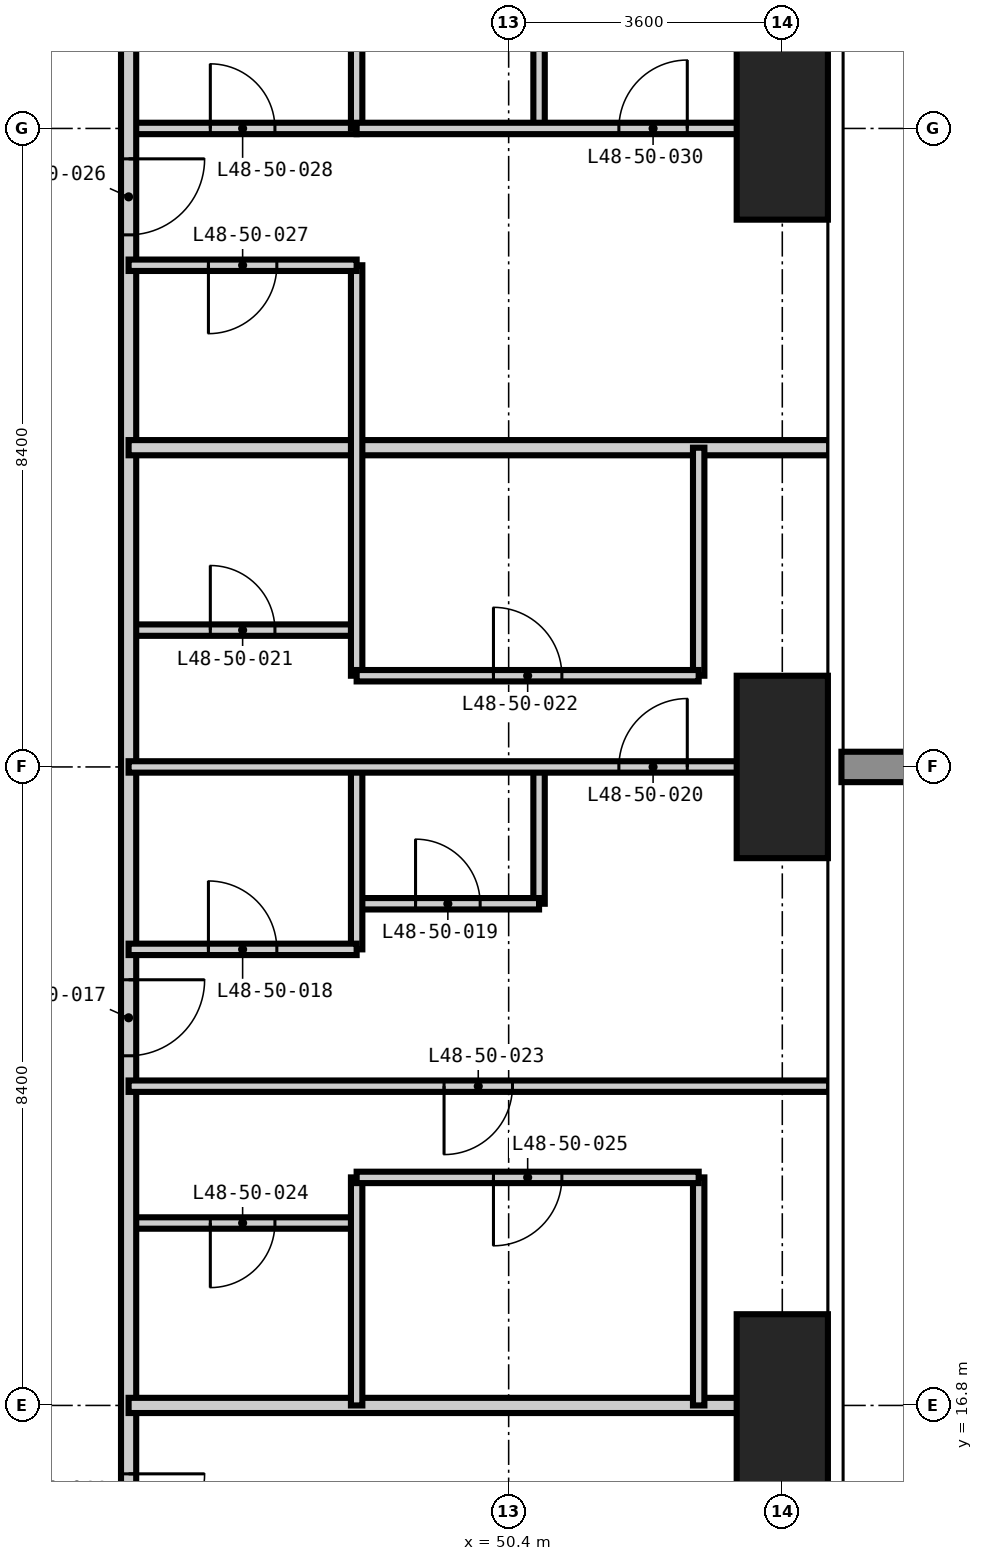
"""IFC4 building model, lengths in metres.
Left out: names, types, materials, properties, quantities, classifications, styles, units other than length and angle.
Written with IfcOpenShell. Run it as: python <this file> out.ifc"""

import sys

from ifc_helpers import new_model, si_unit, direction, frame, frame_2d, origin, origin_2d, place, context, subcontext, project, spatial, rectangle, extrude, element, fill, save


model = new_model("IFC4")
c1 = context("Model", 3, precision=1e-05, world=origin(), true_north=direction((0.0, 1.0)))
c2 = subcontext(c1, "Body", "Model", "MODEL_VIEW")
j1 = project(units=[si_unit("LENGTHUNIT", "METRE"), si_unit("PLANEANGLEUNIT", "RADIAN")], contexts=[c1])
p1 = place(None, origin())
s1 = spatial("IfcSite", under=j1, at=p1, CompositionType="ELEMENT")
p2 = place(p1, origin())
s2 = spatial("IfcBuilding", under=s1, at=p2, CompositionType="ELEMENT")
p3 = place(p2, frame((0.0, 0.0, 187.8)))
s3 = spatial("IfcBuildingStorey", under=s2, at=p3, CompositionType="ELEMENT", Elevation=187.8)
for number, where, z_axis, x_axis in (
    (1, (54.0, 16.8, -0.35), (0.0, 0.0, 1.0), (1.0, 0.0, 0.0)),
    (2, (54.0, 25.2, -0.35), (0.0, 0.0, 1.0), (1.0, 0.0, 0.0)),
    (3, (54.0, 33.6, -0.35), (0.0, 0.0, 1.0), (1.0, 0.0, 0.0)),
):
    element("IfcColumn", number, at=place(p3, frame(where, z_axis=z_axis, x_axis=x_axis)), inside=s3, PredefinedType="COLUMN", context=c2, shape_type="SweptSolid", body=[
        extrude(rectangle(XDim=1.2, YDim=2.4, at=origin_2d()), origin(), (0.0, 0.0, 1.0), 3.6),
    ])
p4 = place(p3, frame((50.8, 23.4, 0.0), z_axis=(0.0, 0.0, 1.0), x_axis=(0.0, 1.0, 0.0)))
e4 = element("IfcWall", 4, at=p4, inside=s3, PredefinedType="PARTITIONING", context=c2, shape_type="SweptSolid", body=[
    extrude(rectangle(XDim=1.8, YDim=0.15, at=frame_2d((0.9, 0.0))), origin(), (0.0, 0.0, 1.0), 3.25),
])
p5 = place(p3, frame((45.4, 19.2, 0.0), z_axis=(0.0, 0.0, 1.0), x_axis=(1.0, 0.0, 0.0)))
e5 = element("IfcWall", 5, at=p5, inside=s3, PredefinedType="PARTITIONING", context=c2, shape_type="SweptSolid", body=[
    extrude(rectangle(XDim=3.0, YDim=0.15, at=frame_2d((1.5, 0.0))), origin(), (0.0, 0.0, 1.0), 3.25),
])
p6 = place(p5, frame((1.075, 0.0, 0.0)))
e6 = element("IfcOpeningElement", 6, at=p6, cuts=e5, PredefinedType="OPENING", context=c2, shape_type="SweptSolid", body=[
    extrude(rectangle(XDim=0.85, YDim=2.1, at=frame_2d((0.425, 1.05))), frame((0.0, 0.085, 0.0), z_axis=(0.0, -1.0, 0.0), x_axis=(1.0, 0.0, 0.0)), (0.0, 0.0, 1.0), 0.17),
])
p7 = place(p3, frame((48.4, 23.4, 0.0), z_axis=(0.0, 0.0, 1.0), x_axis=(1.0, 0.0, 0.0)))
e7 = element("IfcWall", 7, at=p7, inside=s3, PredefinedType="PARTITIONING", context=c2, shape_type="SweptSolid", body=[
    extrude(rectangle(XDim=2.4, YDim=0.15, at=frame_2d((1.2, 0.0))), origin(), (0.0, 0.0, 1.0), 3.25),
])
p8 = place(p7, frame((0.775, 0.0, 0.0)))
e8 = element("IfcOpeningElement", 8, at=p8, cuts=e7, PredefinedType="OPENING", context=c2, shape_type="SweptSolid", body=[
    extrude(rectangle(XDim=0.85, YDim=2.1, at=frame_2d((0.425, 1.05))), frame((0.0, 0.085, 0.0), z_axis=(0.0, -1.0, 0.0), x_axis=(1.0, 0.0, 0.0)), (0.0, 0.0, 1.0), 0.17),
])
p9 = place(p3, frame((45.4, 27.0, 0.0), z_axis=(0.0, 0.0, 1.0), x_axis=(1.0, 0.0, 0.0)))
e9 = element("IfcWall", 9, at=p9, inside=s3, PredefinedType="PARTITIONING", context=c2, shape_type="SweptSolid", body=[
    extrude(rectangle(XDim=3.0, YDim=0.15, at=frame_2d((1.5, 0.0))), origin(), (0.0, 0.0, 1.0), 3.25),
])
p10 = place(p9, frame((1.075, 0.0, 0.0)))
e10 = element("IfcOpeningElement", 10, at=p10, cuts=e9, PredefinedType="OPENING", context=c2, shape_type="SweptSolid", body=[
    extrude(rectangle(XDim=0.85, YDim=2.1, at=frame_2d((0.425, 1.05))), frame((0.0, 0.085, 0.0), z_axis=(0.0, -1.0, 0.0), x_axis=(1.0, 0.0, 0.0)), (0.0, 0.0, 1.0), 0.17),
])
p11 = place(p3, frame((45.4, 33.6, 0.0), z_axis=(0.0, 0.0, 1.0), x_axis=(1.0, 0.0, 0.0)))
e11 = element("IfcWall", 11, at=p11, inside=s3, PredefinedType="PARTITIONING", context=c2, shape_type="SweptSolid", body=[
    extrude(rectangle(XDim=3.0, YDim=0.15, at=frame_2d((1.5, 0.0))), origin(), (0.0, 0.0, 1.0), 3.25),
])
p12 = place(p11, frame((1.075, 0.0, 0.0)))
e12 = element("IfcOpeningElement", 12, at=p12, cuts=e11, PredefinedType="OPENING", context=c2, shape_type="SweptSolid", body=[
    extrude(rectangle(XDim=0.85, YDim=2.1, at=frame_2d((0.425, 1.05))), frame((0.0, 0.085, 0.0), z_axis=(0.0, -1.0, 0.0), x_axis=(1.0, 0.0, 0.0)), (0.0, 0.0, 1.0), 0.17),
])
p13 = place(p3, frame((45.4, 44.2, 0.0), z_axis=(0.0, 0.0, 1.0), x_axis=(0.0, -1.0, 0.0)))
e13 = element("IfcWall", 13, at=p13, inside=s3, PredefinedType="PARTITIONING", context=c2, shape_type="SweptSolid", body=[
    extrude(rectangle(XDim=30.2, YDim=0.2, at=frame_2d((15.1, 0.0))), origin(), (0.0, 0.0, 1.0), 3.25),
])
p14 = place(p13, frame((21.8, 0.0, 0.0)))
e14 = element("IfcOpeningElement", 14, at=p14, cuts=e13, PredefinedType="OPENING", context=c2, shape_type="SweptSolid", body=[
    extrude(rectangle(XDim=1.0, YDim=2.2, at=frame_2d((0.5, 1.1))), frame((0.0, 0.11, 0.0), z_axis=(0.0, -1.0, 0.0), x_axis=(1.0, 0.0, 0.0)), (0.0, 0.0, 1.0), 0.22),
])
p15 = place(p13, frame((11.0, 0.0, 0.0)))
e15 = element("IfcOpeningElement", 15, at=p15, cuts=e13, PredefinedType="OPENING", context=c2, shape_type="SweptSolid", body=[
    extrude(rectangle(XDim=1.0, YDim=2.2, at=frame_2d((0.5, 1.1))), frame((0.0, 0.11, 0.0), z_axis=(0.0, -1.0, 0.0), x_axis=(1.0, 0.0, 0.0)), (0.0, 0.0, 1.0), 0.22),
])
p16 = place(p13, frame((3.8, 0.0, 0.0)))
e16 = element("IfcOpeningElement", 16, at=p16, cuts=e13, PredefinedType="OPENING", context=c2, shape_type="SweptSolid", body=[
    extrude(rectangle(XDim=1.0, YDim=2.2, at=frame_2d((0.5, 1.1))), frame((0.0, 0.11, 0.0), z_axis=(0.0, -1.0, 0.0), x_axis=(1.0, 0.0, 0.0)), (0.0, 0.0, 1.0), 0.22),
])
p17 = place(p13, frame((28.3, 0.0, 0.0)))
e17 = element("IfcOpeningElement", 17, at=p17, cuts=e13, PredefinedType="OPENING", context=c2, shape_type="SweptSolid", body=[
    extrude(rectangle(XDim=1.0, YDim=2.2, at=frame_2d((0.5, 1.1))), frame((0.0, 0.11, 0.0), z_axis=(0.0, -1.0, 0.0), x_axis=(1.0, 0.0, 0.0)), (0.0, 0.0, 1.0), 0.22),
])
p18 = place(p13, frame((0.6, 0.0, 0.0)))
e18 = element("IfcOpeningElement", 18, at=p18, cuts=e13, PredefinedType="OPENING", context=c2, shape_type="SweptSolid", body=[
    extrude(rectangle(XDim=1.0, YDim=2.2, at=frame_2d((0.5, 1.1))), frame((0.0, 0.11, 0.0), z_axis=(0.0, -1.0, 0.0), x_axis=(1.0, 0.0, 0.0)), (0.0, 0.0, 1.0), 0.22),
])
for number, where, z_axis, x_axis in (
    (19, (45.4, 16.8, 0.0), (0.0, 0.0, 1.0), (1.0, 0.0, 0.0)),
    (20, (45.4, 29.4, 0.0), (0.0, 0.0, 1.0), (1.0, 0.0, 0.0)),
):
    element("IfcWall", number, at=place(p3, frame(where, z_axis=z_axis, x_axis=x_axis)), inside=s3, PredefinedType="PARTITIONING", context=c2, shape_type="SweptSolid", body=[
        extrude(rectangle(XDim=9.218, YDim=0.2, at=frame_2d((4.609, 0.0))), origin(), (0.0, 0.0, 1.0), 3.25),
    ])
p19 = place(p3, frame((48.4, 16.8, 0.0), z_axis=(0.0, 0.0, 1.0), x_axis=(0.0, 1.0, 0.0)))
e21 = element("IfcWall", 21, at=p19, inside=s3, PredefinedType="PARTITIONING", context=c2, shape_type="SweptSolid", body=[
    extrude(rectangle(XDim=3.0, YDim=0.15, at=frame_2d((1.5, 0.0))), origin(), (0.0, 0.0, 1.0), 3.25),
])
p20 = place(p3, frame((48.4, 22.8, 0.0), z_axis=(0.0, 0.0, 1.0), x_axis=(0.0, 1.0, 0.0)))
e22 = element("IfcWall", 22, at=p20, inside=s3, PredefinedType="PARTITIONING", context=c2, shape_type="SweptSolid", body=[
    extrude(rectangle(XDim=2.4, YDim=0.15, at=frame_2d((1.2, 0.0))), origin(), (0.0, 0.0, 1.0), 3.25),
])
p21 = place(p3, frame((48.4, 26.4, 0.0), z_axis=(0.0, 0.0, 1.0), x_axis=(0.0, 1.0, 0.0)))
e23 = element("IfcWall", 23, at=p21, inside=s3, PredefinedType="PARTITIONING", context=c2, shape_type="SweptSolid", body=[
    extrude(rectangle(XDim=5.4, YDim=0.15, at=frame_2d((2.7, 0.0))), origin(), (0.0, 0.0, 1.0), 3.25),
])
p22 = place(p3, frame((48.4, 33.6, 0.0), z_axis=(0.0, 0.0, 1.0), x_axis=(0.0, 1.0, 0.0)))
e24 = element("IfcWall", 24, at=p22, inside=s3, PredefinedType="PARTITIONING", context=c2, shape_type="SweptSolid", body=[
    extrude(rectangle(XDim=4.2, YDim=0.15, at=frame_2d((2.1, 0.0))), origin(), (0.0, 0.0, 1.0), 3.25),
])
p23 = place(p3, frame((50.8, 33.6, 0.0), z_axis=(0.0, 0.0, 1.0), x_axis=(0.0, 1.0, 0.0)))
e25 = element("IfcWall", 25, at=p23, inside=s3, PredefinedType="PARTITIONING", context=c2, shape_type="SweptSolid", body=[
    extrude(rectangle(XDim=4.2, YDim=0.15, at=frame_2d((2.1, 0.0))), origin(), (0.0, 0.0, 1.0), 3.25),
])
p24 = place(p23, frame((1.65, 0.0, 0.0)))
e26 = element("IfcOpeningElement", 26, at=p24, cuts=e25, PredefinedType="OPENING", context=c2, shape_type="SweptSolid", body=[
    extrude(rectangle(XDim=0.9, YDim=2.1, at=frame_2d((0.45, 1.05))), frame((0.0, 0.085, 0.0), z_axis=(0.0, -1.0, 0.0), x_axis=(1.0, 0.0, 0.0)), (0.0, 0.0, 1.0), 0.17),
])
for number, where, z_axis, x_axis in (
    (27, (52.9, 16.8, 0.0), (0.0, 0.0, 1.0), (0.0, 1.0, 0.0)),
    (28, (52.9, 26.4, 0.0), (0.0, 0.0, 1.0), (0.0, 1.0, 0.0)),
):
    element("IfcWall", number, at=place(p3, frame(where, z_axis=z_axis, x_axis=x_axis)), inside=s3, PredefinedType="PARTITIONING", context=c2, shape_type="SweptSolid", body=[
        extrude(rectangle(XDim=3.0, YDim=0.15, at=frame_2d((1.5, 0.0))), origin(), (0.0, 0.0, 1.0), 3.25),
    ])
p25 = place(p3, frame((48.4, 19.8, 0.0), z_axis=(0.0, 0.0, 1.0), x_axis=(1.0, 0.0, 0.0)))
e29 = element("IfcWall", 29, at=p25, inside=s3, PredefinedType="PARTITIONING", context=c2, shape_type="SweptSolid", body=[
    extrude(rectangle(XDim=4.5, YDim=0.15, at=frame_2d((2.25, 0.0))), origin(), (0.0, 0.0, 1.0), 3.25),
])
p26 = place(p25, frame((1.8, 0.0, 0.0)))
e30 = element("IfcOpeningElement", 30, at=p26, cuts=e29, PredefinedType="OPENING", context=c2, shape_type="SweptSolid", body=[
    extrude(rectangle(XDim=0.9, YDim=2.1, at=frame_2d((0.45, 1.05))), frame((0.0, 0.085, 0.0), z_axis=(0.0, -1.0, 0.0), x_axis=(1.0, 0.0, 0.0)), (0.0, 0.0, 1.0), 0.17),
])
p27 = place(p3, frame((45.4, 21.0, 0.0), z_axis=(0.0, 0.0, 1.0), x_axis=(1.0, 0.0, 0.0)))
e31 = element("IfcWall", 31, at=p27, inside=s3, PredefinedType="PARTITIONING", context=c2, shape_type="SweptSolid", body=[
    extrude(rectangle(XDim=9.218, YDim=0.15, at=frame_2d((4.609, 0.0))), origin(), (0.0, 0.0, 1.0), 3.25),
])
p28 = place(p27, frame((4.15, 0.0, 0.0)))
e32 = element("IfcOpeningElement", 32, at=p28, cuts=e31, PredefinedType="OPENING", context=c2, shape_type="SweptSolid", body=[
    extrude(rectangle(XDim=0.9, YDim=2.1, at=frame_2d((0.45, 1.05))), frame((0.0, 0.085, 0.0), z_axis=(0.0, -1.0, 0.0), x_axis=(1.0, 0.0, 0.0)), (0.0, 0.0, 1.0), 0.17),
])
p29 = place(p3, frame((45.4, 22.8, 0.0), z_axis=(0.0, 0.0, 1.0), x_axis=(1.0, 0.0, 0.0)))
e33 = element("IfcWall", 33, at=p29, inside=s3, PredefinedType="PARTITIONING", context=c2, shape_type="SweptSolid", body=[
    extrude(rectangle(XDim=3.0, YDim=0.15, at=frame_2d((1.5, 0.0))), origin(), (0.0, 0.0, 1.0), 3.25),
])
p30 = place(p29, frame((1.05, 0.0, 0.0)))
e34 = element("IfcOpeningElement", 34, at=p30, cuts=e33, PredefinedType="OPENING", context=c2, shape_type="SweptSolid", body=[
    extrude(rectangle(XDim=0.9, YDim=2.1, at=frame_2d((0.45, 1.05))), frame((0.0, 0.085, 0.0), z_axis=(0.0, -1.0, 0.0), x_axis=(1.0, 0.0, 0.0)), (0.0, 0.0, 1.0), 0.17),
])
p31 = place(p3, frame((45.4, 25.2, 0.0), z_axis=(0.0, 0.0, 1.0), x_axis=(1.0, 0.0, 0.0)))
e35 = element("IfcWall", 35, at=p31, inside=s3, PredefinedType="PARTITIONING", context=c2, shape_type="SweptSolid", body=[
    extrude(rectangle(XDim=9.218, YDim=0.15, at=frame_2d((4.609, 0.0))), origin(), (0.0, 0.0, 1.0), 3.25),
])
p32 = place(p31, frame((6.45, 0.0, 0.0)))
e36 = element("IfcOpeningElement", 36, at=p32, cuts=e35, PredefinedType="OPENING", context=c2, shape_type="SweptSolid", body=[
    extrude(rectangle(XDim=0.9, YDim=2.1, at=frame_2d((0.45, 1.05))), frame((0.0, 0.085, 0.0), z_axis=(0.0, -1.0, 0.0), x_axis=(1.0, 0.0, 0.0)), (0.0, 0.0, 1.0), 0.17),
])
p33 = place(p3, frame((48.4, 26.4, 0.0), z_axis=(0.0, 0.0, 1.0), x_axis=(1.0, 0.0, 0.0)))
e37 = element("IfcWall", 37, at=p33, inside=s3, PredefinedType="PARTITIONING", context=c2, shape_type="SweptSolid", body=[
    extrude(rectangle(XDim=4.5, YDim=0.15, at=frame_2d((2.25, 0.0))), origin(), (0.0, 0.0, 1.0), 3.25),
])
p34 = place(p33, frame((1.8, 0.0, 0.0)))
e38 = element("IfcOpeningElement", 38, at=p34, cuts=e37, PredefinedType="OPENING", context=c2, shape_type="SweptSolid", body=[
    extrude(rectangle(XDim=0.9, YDim=2.1, at=frame_2d((0.45, 1.05))), frame((0.0, 0.085, 0.0), z_axis=(0.0, -1.0, 0.0), x_axis=(1.0, 0.0, 0.0)), (0.0, 0.0, 1.0), 0.17),
])
p35 = place(p3, frame((45.4, 31.8, 0.0), z_axis=(0.0, 0.0, 1.0), x_axis=(1.0, 0.0, 0.0)))
e39 = element("IfcWall", 39, at=p35, inside=s3, PredefinedType="PARTITIONING", context=c2, shape_type="SweptSolid", body=[
    extrude(rectangle(XDim=3.0, YDim=0.15, at=frame_2d((1.5, 0.0))), origin(), (0.0, 0.0, 1.0), 3.25),
])
p36 = place(p35, frame((1.05, 0.0, 0.0)))
e40 = element("IfcOpeningElement", 40, at=p36, cuts=e39, PredefinedType="OPENING", context=c2, shape_type="SweptSolid", body=[
    extrude(rectangle(XDim=0.9, YDim=2.1, at=frame_2d((0.45, 1.05))), frame((0.0, 0.085, 0.0), z_axis=(0.0, -1.0, 0.0), x_axis=(1.0, 0.0, 0.0)), (0.0, 0.0, 1.0), 0.17),
])
p37 = place(p3, frame((48.4, 33.6, 0.0), z_axis=(0.0, 0.0, 1.0), x_axis=(1.0, 0.0, 0.0)))
e41 = element("IfcWall", 41, at=p37, inside=s3, PredefinedType="PARTITIONING", context=c2, shape_type="SweptSolid", body=[
    extrude(rectangle(XDim=6.218, YDim=0.15, at=frame_2d((3.109, 0.0))), origin(), (0.0, 0.0, 1.0), 3.25),
])
p38 = place(p37, frame((3.45, 0.0, 0.0)))
e42 = element("IfcOpeningElement", 42, at=p38, cuts=e41, PredefinedType="OPENING", context=c2, shape_type="SweptSolid", body=[
    extrude(rectangle(XDim=0.9, YDim=2.1, at=frame_2d((0.45, 1.05))), frame((0.0, 0.085, 0.0), z_axis=(0.0, -1.0, 0.0), x_axis=(1.0, 0.0, 0.0)), (0.0, 0.0, 1.0), 0.17),
])
p39 = place(p14, origin())
e43 = element("IfcDoor", 43, at=p39, inside=s3, OperationType="SINGLE_SWING_LEFT", PredefinedType="DOOR", context=c2, shape_type="SweptSolid", body=[
    extrude(rectangle(XDim=1.0, YDim=2.2, at=frame_2d((0.5, 1.1))), frame((0.0, 0.025, 0.0), z_axis=(0.0, -1.0, 0.0), x_axis=(1.0, 0.0, 0.0)), (0.0, 0.0, 1.0), 0.05),
])
fill(e14, e43)
p40 = place(p30, origin())
e44 = element("IfcDoor", 44, at=p40, inside=s3, OperationType="SINGLE_SWING_LEFT", PredefinedType="DOOR", context=c2, shape_type="SweptSolid", body=[
    extrude(rectangle(XDim=0.9, YDim=2.1, at=frame_2d((0.45, 1.05))), frame((0.0, 0.025, 0.0), z_axis=(0.0, -1.0, 0.0), x_axis=(1.0, 0.0, 0.0)), (0.0, 0.0, 1.0), 0.05),
])
fill(e34, e44)
p41 = place(p8, origin())
e45 = element("IfcDoor", 45, at=p41, inside=s3, OperationType="SINGLE_SWING_LEFT", PredefinedType="DOOR", context=c2, shape_type="SweptSolid", body=[
    extrude(rectangle(XDim=0.85, YDim=2.1, at=frame_2d((0.425, 1.05))), frame((0.0, 0.025, 0.0), z_axis=(0.0, -1.0, 0.0), x_axis=(1.0, 0.0, 0.0)), (0.0, 0.0, 1.0), 0.05),
])
fill(e8, e45)
p42 = place(p32, origin())
e46 = element("IfcDoor", 46, at=p42, inside=s3, OperationType="SINGLE_SWING_RIGHT", PredefinedType="DOOR", context=c2, shape_type="SweptSolid", body=[
    extrude(rectangle(XDim=0.9, YDim=2.1, at=frame_2d((0.45, 1.05))), frame((0.0, 0.025, 0.0), z_axis=(0.0, -1.0, 0.0), x_axis=(1.0, 0.0, 0.0)), (0.0, 0.0, 1.0), 0.05),
])
fill(e36, e46)
p43 = place(p10, origin())
e47 = element("IfcDoor", 47, at=p43, inside=s3, OperationType="SINGLE_SWING_LEFT", PredefinedType="DOOR", context=c2, shape_type="SweptSolid", body=[
    extrude(rectangle(XDim=0.85, YDim=2.1, at=frame_2d((0.425, 1.05))), frame((0.0, 0.025, 0.0), z_axis=(0.0, -1.0, 0.0), x_axis=(1.0, 0.0, 0.0)), (0.0, 0.0, 1.0), 0.05),
])
fill(e10, e47)
p44 = place(p34, origin())
e48 = element("IfcDoor", 48, at=p44, inside=s3, OperationType="SINGLE_SWING_LEFT", PredefinedType="DOOR", context=c2, shape_type="SweptSolid", body=[
    extrude(rectangle(XDim=0.9, YDim=2.1, at=frame_2d((0.45, 1.05))), frame((0.0, 0.025, 0.0), z_axis=(0.0, -1.0, 0.0), x_axis=(1.0, 0.0, 0.0)), (0.0, 0.0, 1.0), 0.05),
])
fill(e38, e48)
p45 = place(p28, frame((0.9, 0.0, 0.0), z_axis=(0.0, 0.0, 1.0), x_axis=(-1.0, 0.0, 0.0)))
e49 = element("IfcDoor", 49, at=p45, inside=s3, OperationType="SINGLE_SWING_RIGHT", PredefinedType="DOOR", context=c2, shape_type="SweptSolid", body=[
    extrude(rectangle(XDim=0.9, YDim=2.1, at=frame_2d((0.45, 1.05))), frame((0.0, 0.025, 0.0), z_axis=(0.0, -1.0, 0.0), x_axis=(1.0, 0.0, 0.0)), (0.0, 0.0, 1.0), 0.05),
])
fill(e32, e49)
p46 = place(p6, frame((0.85, 0.0, 0.0), z_axis=(0.0, 0.0, 1.0), x_axis=(-1.0, 0.0, 0.0)))
e50 = element("IfcDoor", 50, at=p46, inside=s3, OperationType="SINGLE_SWING_RIGHT", PredefinedType="DOOR", context=c2, shape_type="SweptSolid", body=[
    extrude(rectangle(XDim=0.85, YDim=2.1, at=frame_2d((0.425, 1.05))), frame((0.0, 0.025, 0.0), z_axis=(0.0, -1.0, 0.0), x_axis=(1.0, 0.0, 0.0)), (0.0, 0.0, 1.0), 0.05),
])
fill(e6, e50)
p47 = place(p26, frame((0.9, 0.0, 0.0), z_axis=(0.0, 0.0, 1.0), x_axis=(-1.0, 0.0, 0.0)))
e51 = element("IfcDoor", 51, at=p47, inside=s3, OperationType="SINGLE_SWING_RIGHT", PredefinedType="DOOR", context=c2, shape_type="SweptSolid", body=[
    extrude(rectangle(XDim=0.9, YDim=2.1, at=frame_2d((0.45, 1.05))), frame((0.0, 0.025, 0.0), z_axis=(0.0, -1.0, 0.0), x_axis=(1.0, 0.0, 0.0)), (0.0, 0.0, 1.0), 0.05),
])
fill(e30, e51)
p48 = place(p15, origin())
e52 = element("IfcDoor", 52, at=p48, inside=s3, OperationType="SINGLE_SWING_LEFT", PredefinedType="DOOR", context=c2, shape_type="SweptSolid", body=[
    extrude(rectangle(XDim=1.0, YDim=2.2, at=frame_2d((0.5, 1.1))), frame((0.0, 0.025, 0.0), z_axis=(0.0, -1.0, 0.0), x_axis=(1.0, 0.0, 0.0)), (0.0, 0.0, 1.0), 0.05),
])
fill(e15, e52)
p49 = place(p36, frame((0.9, 0.0, 0.0), z_axis=(0.0, 0.0, 1.0), x_axis=(-1.0, 0.0, 0.0)))
e53 = element("IfcDoor", 53, at=p49, inside=s3, OperationType="SINGLE_SWING_RIGHT", PredefinedType="DOOR", context=c2, shape_type="SweptSolid", body=[
    extrude(rectangle(XDim=0.9, YDim=2.1, at=frame_2d((0.45, 1.05))), frame((0.0, 0.025, 0.0), z_axis=(0.0, -1.0, 0.0), x_axis=(1.0, 0.0, 0.0)), (0.0, 0.0, 1.0), 0.05),
])
fill(e40, e53)
p50 = place(p12, origin())
e54 = element("IfcDoor", 54, at=p50, inside=s3, OperationType="SINGLE_SWING_LEFT", PredefinedType="DOOR", context=c2, shape_type="SweptSolid", body=[
    extrude(rectangle(XDim=0.85, YDim=2.1, at=frame_2d((0.425, 1.05))), frame((0.0, 0.025, 0.0), z_axis=(0.0, -1.0, 0.0), x_axis=(1.0, 0.0, 0.0)), (0.0, 0.0, 1.0), 0.05),
])
fill(e12, e54)
p51 = place(p38, origin())
e55 = element("IfcDoor", 55, at=p51, inside=s3, OperationType="SINGLE_SWING_RIGHT", PredefinedType="DOOR", context=c2, shape_type="SweptSolid", body=[
    extrude(rectangle(XDim=0.9, YDim=2.1, at=frame_2d((0.45, 1.05))), frame((0.0, 0.025, 0.0), z_axis=(0.0, -1.0, 0.0), x_axis=(1.0, 0.0, 0.0)), (0.0, 0.0, 1.0), 0.05),
])
fill(e42, e55)
p52 = place(p17, origin())
e56 = element("IfcDoor", 56, at=p52, inside=s3, OperationType="SINGLE_SWING_LEFT", PredefinedType="DOOR", context=c2, shape_type="SweptSolid", body=[
    extrude(rectangle(XDim=1.0, YDim=2.2, at=frame_2d((0.5, 1.1))), frame((0.0, 0.025, 0.0), z_axis=(0.0, -1.0, 0.0), x_axis=(1.0, 0.0, 0.0)), (0.0, 0.0, 1.0), 0.05),
])
fill(e17, e56)
save(model, sys.argv[1])
